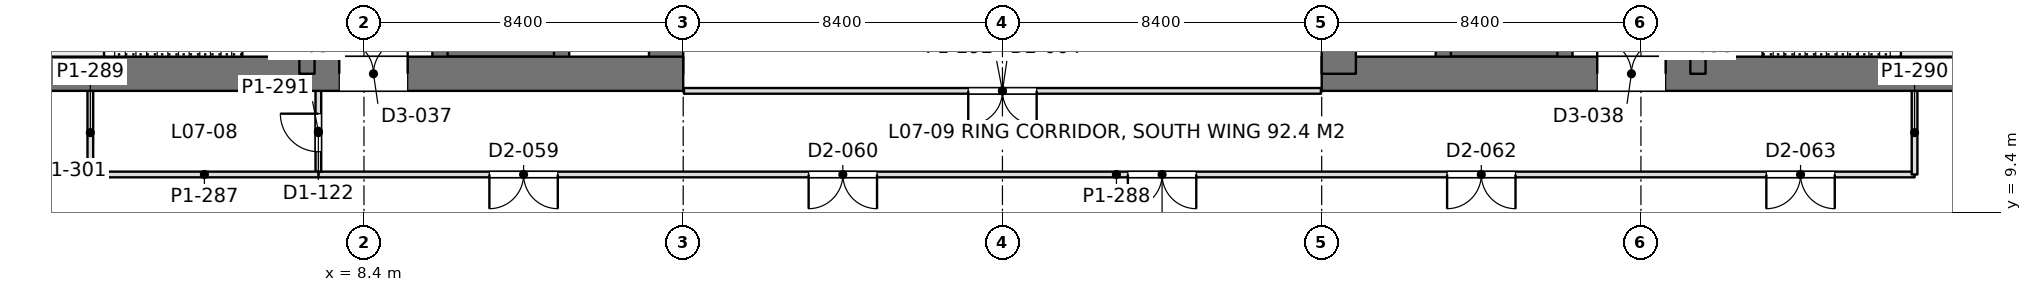
"""IFC4 building model, lengths in metres.
Left out: names, types, materials, properties, quantities, classifications, styles, units other than length and angle.
Written with IfcOpenShell. Run it as: python <this file> out.ifc"""

import sys

from ifc_helpers import new_model, si_unit, direction, frame, frame_2d, origin, place, context, subcontext, project, spatial, rectangle, extrude, element, fill, save


model = new_model("IFC4")
c1 = context("Model", 3, precision=1e-05, world=origin(), true_north=direction((0.0, 1.0)))
c2 = subcontext(c1, "Body", "Model", "MODEL_VIEW")
j1 = project(units=[si_unit("LENGTHUNIT", "METRE"), si_unit("PLANEANGLEUNIT", "RADIAN")], contexts=[c1])
p1 = place(None, origin())
s1 = spatial("IfcSite", under=j1, at=p1, CompositionType="ELEMENT")
p2 = place(p1, origin())
s2 = spatial("IfcBuilding", under=s1, at=p2, CompositionType="ELEMENT")
p3 = place(p2, frame((0.0, 0.0, 32.4)))
s3 = spatial("IfcBuildingStorey", under=s2, at=p3, CompositionType="ELEMENT", Elevation=32.4)
p4 = place(p3, frame((-1.2, 13.05, 0.0), z_axis=(0.0, 0.0, 1.0), x_axis=(1.0, 0.0, 0.0)))
e1 = element("IfcWall", 1, at=p4, inside=s3, PredefinedType="SHEAR", context=c2, shape_type="SweptSolid", body=[
    extrude(rectangle(XDim=18.0, YDim=0.9, at=frame_2d((9.0, 0.0))), origin(), (0.0, 0.0, 1.0), 4.5),
])
p5 = place(p4, frame((8.95, 0.0, 0.0)))
e2 = element("IfcOpeningElement", 2, at=p5, cuts=e1, PredefinedType="OPENING", context=c2, shape_type="SweptSolid", body=[
    extrude(rectangle(XDim=1.8, YDim=2.4, at=frame_2d((0.9, 1.2))), frame((0.0, 0.46, 0.0), z_axis=(0.0, -1.0, 0.0), x_axis=(1.0, 0.0, 0.0)), (0.0, 0.0, 1.0), 0.92),
])
p6 = place(p3, frame((16.35, 13.05, 0.0), z_axis=(0.0, 0.0, 1.0), x_axis=(0.0, 1.0, 0.0)))
e3 = element("IfcWall", 3, at=p6, inside=s3, PredefinedType="SHEAR", context=c2, shape_type="SweptSolid", body=[
    extrude(rectangle(XDim=24.3, YDim=0.9, at=frame_2d((12.15, 0.0))), origin(), (0.0, 0.0, 1.0), 4.5),
])
p7 = place(p3, frame((6.9, 13.05, 0.0), z_axis=(0.0, 0.0, 1.0), x_axis=(0.0, 1.0, 0.0)))
e4 = element("IfcWall", 4, at=p7, inside=s3, PredefinedType="SHEAR", context=c2, shape_type="SweptSolid", body=[
    extrude(rectangle(XDim=24.3, YDim=0.4, at=frame_2d((12.15, 0.0))), origin(), (0.0, 0.0, 1.0), 4.5),
])
p8 = place(p7, frame((1.3, 0.0, 0.0)))
e5 = element("IfcOpeningElement", 5, at=p8, cuts=e4, PredefinedType="OPENING", context=c2, shape_type="SweptSolid", body=[
    extrude(rectangle(XDim=1.0, YDim=2.2, at=frame_2d((0.5, 1.1))), frame((0.0, 0.21, 0.0), z_axis=(0.0, -1.0, 0.0), x_axis=(1.0, 0.0, 0.0)), (0.0, 0.0, 1.0), 0.42),
])
p9 = place(p7, frame((22.0, 0.0, 0.0)))
e6 = element("IfcOpeningElement", 6, at=p9, cuts=e4, PredefinedType="OPENING", context=c2, shape_type="SweptSolid", body=[
    extrude(rectangle(XDim=1.0, YDim=2.2, at=frame_2d((0.5, 1.1))), frame((0.0, 0.21, 0.0), z_axis=(0.0, -1.0, 0.0), x_axis=(1.0, 0.0, 0.0)), (0.0, 0.0, 1.0), 0.42),
])
p10 = place(p7, frame((5.55, 0.0, 0.0)))
e7 = element("IfcOpeningElement", 7, at=p10, cuts=e4, PredefinedType="OPENING", context=c2, shape_type="SweptSolid", body=[
    extrude(rectangle(XDim=1.0, YDim=2.2, at=frame_2d((0.5, 1.1))), frame((0.0, 0.21, 0.0), z_axis=(0.0, -1.0, 0.0), x_axis=(1.0, 0.0, 0.0)), (0.0, 0.0, 1.0), 0.42),
])
p11 = place(p7, frame((9.55, 0.0, 0.0)))
e8 = element("IfcOpeningElement", 8, at=p11, cuts=e4, PredefinedType="OPENING", context=c2, shape_type="SweptSolid", body=[
    extrude(rectangle(XDim=1.0, YDim=2.2, at=frame_2d((0.5, 1.1))), frame((0.0, 0.21, 0.0), z_axis=(0.0, -1.0, 0.0), x_axis=(1.0, 0.0, 0.0)), (0.0, 0.0, 1.0), 0.42),
])
p12 = place(p7, frame((12.8, 0.0, 0.0)))
e9 = element("IfcOpeningElement", 9, at=p12, cuts=e4, PredefinedType="OPENING", context=c2, shape_type="SweptSolid", body=[
    extrude(rectangle(XDim=1.1, YDim=2.2, at=frame_2d((0.55, 1.1))), frame((0.0, 0.21, 0.0), z_axis=(0.0, -1.0, 0.0), x_axis=(1.0, 0.0, 0.0)), (0.0, 0.0, 1.0), 0.42),
])
p13 = place(p7, frame((15.538, 0.0, 0.0)))
e10 = element("IfcOpeningElement", 10, at=p13, cuts=e4, PredefinedType="OPENING", context=c2, shape_type="SweptSolid", body=[
    extrude(rectangle(XDim=1.1, YDim=2.2, at=frame_2d((0.55, 1.1))), frame((0.0, 0.21, 0.0), z_axis=(0.0, -1.0, 0.0), x_axis=(1.0, 0.0, 0.0)), (0.0, 0.0, 1.0), 0.42),
])
p14 = place(p7, frame((18.262, 0.0, 0.0)))
e11 = element("IfcOpeningElement", 11, at=p14, cuts=e4, PredefinedType="OPENING", context=c2, shape_type="SweptSolid", body=[
    extrude(rectangle(XDim=1.1, YDim=2.2, at=frame_2d((0.55, 1.1))), frame((0.0, 0.21, 0.0), z_axis=(0.0, -1.0, 0.0), x_axis=(1.0, 0.0, 0.0)), (0.0, 0.0, 1.0), 0.42),
])
p15 = place(p3, frame((10.4, 13.05, 0.0), z_axis=(0.0, 0.0, 1.0), x_axis=(0.0, 1.0, 0.0)))
e12 = element("IfcWall", 12, at=p15, inside=s3, PredefinedType="SHEAR", context=c2, shape_type="SweptSolid", body=[
    extrude(rectangle(XDim=24.3, YDim=0.4, at=frame_2d((12.15, 0.0))), origin(), (0.0, 0.0, 1.0), 4.5),
])
p16 = place(p15, frame((1.5, 0.0, 0.0)))
e13 = element("IfcOpeningElement", 13, at=p16, cuts=e12, PredefinedType="OPENING", context=c2, shape_type="SweptSolid", body=[
    extrude(rectangle(XDim=1.1, YDim=2.2, at=frame_2d((0.55, 1.1))), frame((0.0, 0.21, 0.0), z_axis=(0.0, -1.0, 0.0), x_axis=(1.0, 0.0, 0.0)), (0.0, 0.0, 1.0), 0.42),
])
p17 = place(p15, frame((4.35, 0.0, 0.0)))
e14 = element("IfcOpeningElement", 14, at=p17, cuts=e12, PredefinedType="OPENING", context=c2, shape_type="SweptSolid", body=[
    extrude(rectangle(XDim=1.1, YDim=2.2, at=frame_2d((0.55, 1.1))), frame((0.0, 0.21, 0.0), z_axis=(0.0, -1.0, 0.0), x_axis=(1.0, 0.0, 0.0)), (0.0, 0.0, 1.0), 0.42),
])
p18 = place(p15, frame((7.2, 0.0, 0.0)))
e15 = element("IfcOpeningElement", 15, at=p18, cuts=e12, PredefinedType="OPENING", context=c2, shape_type="SweptSolid", body=[
    extrude(rectangle(XDim=1.1, YDim=2.2, at=frame_2d((0.55, 1.1))), frame((0.0, 0.21, 0.0), z_axis=(0.0, -1.0, 0.0), x_axis=(1.0, 0.0, 0.0)), (0.0, 0.0, 1.0), 0.42),
])
p19 = place(p15, frame((21.45, 0.0, 0.0)))
e16 = element("IfcOpeningElement", 16, at=p19, cuts=e12, PredefinedType="OPENING", context=c2, shape_type="SweptSolid", body=[
    extrude(rectangle(XDim=1.1, YDim=2.2, at=frame_2d((0.55, 1.1))), frame((0.0, 0.21, 0.0), z_axis=(0.0, -1.0, 0.0), x_axis=(1.0, 0.0, 0.0)), (0.0, 0.0, 1.0), 0.42),
])
p20 = place(p3, frame((13.6, 13.05, 0.0), z_axis=(0.0, 0.0, 1.0), x_axis=(0.0, 1.0, 0.0)))
e17 = element("IfcWall", 17, at=p20, inside=s3, PredefinedType="SHEAR", context=c2, shape_type="SweptSolid", body=[
    extrude(rectangle(XDim=24.3, YDim=0.4, at=frame_2d((12.15, 0.0))), origin(), (0.0, 0.0, 1.0), 4.5),
])
p21 = place(p3, frame((10.4, 13.65, 0.0), z_axis=(0.0, 0.0, 1.0), x_axis=(1.0, 0.0, 0.0)))
e18 = element("IfcWall", 18, at=p21, inside=s3, PredefinedType="SHEAR", context=c2, shape_type="SweptSolid", body=[
    extrude(rectangle(XDim=3.2, YDim=0.3, at=frame_2d((1.6, 0.0))), origin(), (0.0, 0.0, 1.0), 4.5),
])
p22 = place(p3, frame((33.6, 13.05, 0.0), z_axis=(0.0, 0.0, 1.0), x_axis=(1.0, 0.0, 0.0)))
e19 = element("IfcWall", 19, at=p22, inside=s3, PredefinedType="SHEAR", context=c2, shape_type="SweptSolid", body=[
    extrude(rectangle(XDim=18.0, YDim=0.9, at=frame_2d((9.0, 0.0))), origin(), (0.0, 0.0, 1.0), 4.5),
])
p23 = place(p22, frame((7.25, 0.0, 0.0)))
e20 = element("IfcOpeningElement", 20, at=p23, cuts=e19, PredefinedType="OPENING", context=c2, shape_type="SweptSolid", body=[
    extrude(rectangle(XDim=1.8, YDim=2.4, at=frame_2d((0.9, 1.2))), frame((0.0, 0.46, 0.0), z_axis=(0.0, -1.0, 0.0), x_axis=(1.0, 0.0, 0.0)), (0.0, 0.0, 1.0), 0.92),
])
p24 = place(p3, frame((34.05, 13.05, 0.0), z_axis=(0.0, 0.0, 1.0), x_axis=(0.0, 1.0, 0.0)))
e21 = element("IfcWall", 21, at=p24, inside=s3, PredefinedType="SHEAR", context=c2, shape_type="SweptSolid", body=[
    extrude(rectangle(XDim=24.3, YDim=0.9, at=frame_2d((12.15, 0.0))), origin(), (0.0, 0.0, 1.0), 4.5),
])
p25 = place(p3, frame((43.5, 13.05, 0.0), z_axis=(0.0, 0.0, 1.0), x_axis=(0.0, 1.0, 0.0)))
e22 = element("IfcWall", 22, at=p25, inside=s3, PredefinedType="SHEAR", context=c2, shape_type="SweptSolid", body=[
    extrude(rectangle(XDim=24.3, YDim=0.4, at=frame_2d((12.15, 0.0))), origin(), (0.0, 0.0, 1.0), 4.5),
])
p26 = place(p25, frame((1.3, 0.0, 0.0)))
e23 = element("IfcOpeningElement", 23, at=p26, cuts=e22, PredefinedType="OPENING", context=c2, shape_type="SweptSolid", body=[
    extrude(rectangle(XDim=1.0, YDim=2.2, at=frame_2d((0.5, 1.1))), frame((0.0, 0.21, 0.0), z_axis=(0.0, -1.0, 0.0), x_axis=(1.0, 0.0, 0.0)), (0.0, 0.0, 1.0), 0.42),
])
p27 = place(p25, frame((22.0, 0.0, 0.0)))
e24 = element("IfcOpeningElement", 24, at=p27, cuts=e22, PredefinedType="OPENING", context=c2, shape_type="SweptSolid", body=[
    extrude(rectangle(XDim=1.0, YDim=2.2, at=frame_2d((0.5, 1.1))), frame((0.0, 0.21, 0.0), z_axis=(0.0, -1.0, 0.0), x_axis=(1.0, 0.0, 0.0)), (0.0, 0.0, 1.0), 0.42),
])
p28 = place(p25, frame((5.55, 0.0, 0.0)))
e25 = element("IfcOpeningElement", 25, at=p28, cuts=e22, PredefinedType="OPENING", context=c2, shape_type="SweptSolid", body=[
    extrude(rectangle(XDim=1.0, YDim=2.2, at=frame_2d((0.5, 1.1))), frame((0.0, 0.21, 0.0), z_axis=(0.0, -1.0, 0.0), x_axis=(1.0, 0.0, 0.0)), (0.0, 0.0, 1.0), 0.42),
])
p29 = place(p25, frame((9.55, 0.0, 0.0)))
e26 = element("IfcOpeningElement", 26, at=p29, cuts=e22, PredefinedType="OPENING", context=c2, shape_type="SweptSolid", body=[
    extrude(rectangle(XDim=1.0, YDim=2.2, at=frame_2d((0.5, 1.1))), frame((0.0, 0.21, 0.0), z_axis=(0.0, -1.0, 0.0), x_axis=(1.0, 0.0, 0.0)), (0.0, 0.0, 1.0), 0.42),
])
p30 = place(p25, frame((12.8, 0.0, 0.0)))
e27 = element("IfcOpeningElement", 27, at=p30, cuts=e22, PredefinedType="OPENING", context=c2, shape_type="SweptSolid", body=[
    extrude(rectangle(XDim=1.1, YDim=2.2, at=frame_2d((0.55, 1.1))), frame((0.0, 0.21, 0.0), z_axis=(0.0, -1.0, 0.0), x_axis=(1.0, 0.0, 0.0)), (0.0, 0.0, 1.0), 0.42),
])
p31 = place(p25, frame((15.538, 0.0, 0.0)))
e28 = element("IfcOpeningElement", 28, at=p31, cuts=e22, PredefinedType="OPENING", context=c2, shape_type="SweptSolid", body=[
    extrude(rectangle(XDim=1.1, YDim=2.2, at=frame_2d((0.55, 1.1))), frame((0.0, 0.21, 0.0), z_axis=(0.0, -1.0, 0.0), x_axis=(1.0, 0.0, 0.0)), (0.0, 0.0, 1.0), 0.42),
])
p32 = place(p25, frame((18.262, 0.0, 0.0)))
e29 = element("IfcOpeningElement", 29, at=p32, cuts=e22, PredefinedType="OPENING", context=c2, shape_type="SweptSolid", body=[
    extrude(rectangle(XDim=1.1, YDim=2.2, at=frame_2d((0.55, 1.1))), frame((0.0, 0.21, 0.0), z_axis=(0.0, -1.0, 0.0), x_axis=(1.0, 0.0, 0.0)), (0.0, 0.0, 1.0), 0.42),
])
p33 = place(p3, frame((40.0, 13.05, 0.0), z_axis=(0.0, 0.0, 1.0), x_axis=(0.0, 1.0, 0.0)))
e30 = element("IfcWall", 30, at=p33, inside=s3, PredefinedType="SHEAR", context=c2, shape_type="SweptSolid", body=[
    extrude(rectangle(XDim=24.3, YDim=0.4, at=frame_2d((12.15, 0.0))), origin(), (0.0, 0.0, 1.0), 4.5),
])
p34 = place(p33, frame((1.5, 0.0, 0.0)))
e31 = element("IfcOpeningElement", 31, at=p34, cuts=e30, PredefinedType="OPENING", context=c2, shape_type="SweptSolid", body=[
    extrude(rectangle(XDim=1.1, YDim=2.2, at=frame_2d((0.55, 1.1))), frame((0.0, 0.21, 0.0), z_axis=(0.0, -1.0, 0.0), x_axis=(1.0, 0.0, 0.0)), (0.0, 0.0, 1.0), 0.42),
])
p35 = place(p33, frame((4.35, 0.0, 0.0)))
e32 = element("IfcOpeningElement", 32, at=p35, cuts=e30, PredefinedType="OPENING", context=c2, shape_type="SweptSolid", body=[
    extrude(rectangle(XDim=1.1, YDim=2.2, at=frame_2d((0.55, 1.1))), frame((0.0, 0.21, 0.0), z_axis=(0.0, -1.0, 0.0), x_axis=(1.0, 0.0, 0.0)), (0.0, 0.0, 1.0), 0.42),
])
p36 = place(p33, frame((7.2, 0.0, 0.0)))
e33 = element("IfcOpeningElement", 33, at=p36, cuts=e30, PredefinedType="OPENING", context=c2, shape_type="SweptSolid", body=[
    extrude(rectangle(XDim=1.1, YDim=2.2, at=frame_2d((0.55, 1.1))), frame((0.0, 0.21, 0.0), z_axis=(0.0, -1.0, 0.0), x_axis=(1.0, 0.0, 0.0)), (0.0, 0.0, 1.0), 0.42),
])
p37 = place(p33, frame((21.45, 0.0, 0.0)))
e34 = element("IfcOpeningElement", 34, at=p37, cuts=e30, PredefinedType="OPENING", context=c2, shape_type="SweptSolid", body=[
    extrude(rectangle(XDim=1.1, YDim=2.2, at=frame_2d((0.55, 1.1))), frame((0.0, 0.21, 0.0), z_axis=(0.0, -1.0, 0.0), x_axis=(1.0, 0.0, 0.0)), (0.0, 0.0, 1.0), 0.42),
])
p38 = place(p3, frame((36.8, 13.05, 0.0), z_axis=(0.0, 0.0, 1.0), x_axis=(0.0, 1.0, 0.0)))
e35 = element("IfcWall", 35, at=p38, inside=s3, PredefinedType="SHEAR", context=c2, shape_type="SweptSolid", body=[
    extrude(rectangle(XDim=24.3, YDim=0.4, at=frame_2d((12.15, 0.0))), origin(), (0.0, 0.0, 1.0), 4.5),
])
p39 = place(p3, frame((40.0, 13.65, 0.0), z_axis=(0.0, 0.0, 1.0), x_axis=(-1.0, 0.0, 0.0)))
e36 = element("IfcWall", 36, at=p39, inside=s3, PredefinedType="SHEAR", context=c2, shape_type="SweptSolid", body=[
    extrude(rectangle(XDim=3.2, YDim=0.3, at=frame_2d((1.6, 0.0))), origin(), (0.0, 0.0, 1.0), 4.5),
])
p40 = place(p3, frame((7.198, 10.4, 0.0), z_axis=(0.0, 0.0, 1.0), x_axis=(1.0, 0.0, 0.0)))
e37 = element("IfcWall", 37, at=p40, inside=s3, PredefinedType="PARTITIONING", context=c2, shape_type="SweptSolid", body=[
    extrude(rectangle(XDim=42.002, YDim=0.15, at=frame_2d((21.001, 0.0))), origin(), (0.0, 0.0, 1.0), 3.74),
])
p41 = place(p40, frame((4.502, 0.0, 0.0)))
e38 = element("IfcOpeningElement", 38, at=p41, cuts=e37, PredefinedType="OPENING", context=c2, shape_type="SweptSolid", body=[
    extrude(rectangle(XDim=1.8, YDim=2.2, at=frame_2d((0.9, 1.1))), frame((0.0, 0.085, 0.0), z_axis=(0.0, -1.0, 0.0), x_axis=(1.0, 0.0, 0.0)), (0.0, 0.0, 1.0), 0.17),
])
p42 = place(p40, frame((12.902, 0.0, 0.0)))
e39 = element("IfcOpeningElement", 39, at=p42, cuts=e37, PredefinedType="OPENING", context=c2, shape_type="SweptSolid", body=[
    extrude(rectangle(XDim=1.8, YDim=2.2, at=frame_2d((0.9, 1.1))), frame((0.0, 0.085, 0.0), z_axis=(0.0, -1.0, 0.0), x_axis=(1.0, 0.0, 0.0)), (0.0, 0.0, 1.0), 0.17),
])
p43 = place(p40, frame((21.302, 0.0, 0.0)))
e40 = element("IfcOpeningElement", 40, at=p43, cuts=e37, PredefinedType="OPENING", context=c2, shape_type="SweptSolid", body=[
    extrude(rectangle(XDim=1.8, YDim=2.2, at=frame_2d((0.9, 1.1))), frame((0.0, 0.085, 0.0), z_axis=(0.0, -1.0, 0.0), x_axis=(1.0, 0.0, 0.0)), (0.0, 0.0, 1.0), 0.17),
])
p44 = place(p40, frame((29.702, 0.0, 0.0)))
e41 = element("IfcOpeningElement", 41, at=p44, cuts=e37, PredefinedType="OPENING", context=c2, shape_type="SweptSolid", body=[
    extrude(rectangle(XDim=1.8, YDim=2.2, at=frame_2d((0.9, 1.1))), frame((0.0, 0.085, 0.0), z_axis=(0.0, -1.0, 0.0), x_axis=(1.0, 0.0, 0.0)), (0.0, 0.0, 1.0), 0.17),
])
p45 = place(p40, frame((38.102, 0.0, 0.0)))
e42 = element("IfcOpeningElement", 42, at=p45, cuts=e37, PredefinedType="OPENING", context=c2, shape_type="SweptSolid", body=[
    extrude(rectangle(XDim=1.8, YDim=2.2, at=frame_2d((0.9, 1.1))), frame((0.0, 0.085, 0.0), z_axis=(0.0, -1.0, 0.0), x_axis=(1.0, 0.0, 0.0)), (0.0, 0.0, 1.0), 0.17),
])
p46 = place(p3, frame((7.2, 10.474, 0.0), z_axis=(0.0, 0.0, 1.0), x_axis=(0.0, 1.0, 0.0)))
e43 = element("IfcWall", 43, at=p46, inside=s3, PredefinedType="PARTITIONING", context=c2, shape_type="SweptSolid", body=[
    extrude(rectangle(XDim=2.128, YDim=0.15, at=frame_2d((1.064, 0.0))), origin(), (0.0, 0.0, 1.0), 4.34),
])
p47 = place(p46, frame((0.526, 0.0, 0.0)))
e44 = element("IfcOpeningElement", 44, at=p47, cuts=e43, PredefinedType="OPENING", context=c2, shape_type="SweptSolid", body=[
    extrude(rectangle(XDim=1.0, YDim=2.2, at=frame_2d((0.5, 1.1))), frame((0.0, 0.085, 0.0), z_axis=(0.0, -1.0, 0.0), x_axis=(1.0, 0.0, 0.0)), (0.0, 0.0, 1.0), 0.17),
])
p48 = place(p3, frame((49.2, 10.4, 0.0), z_axis=(0.0, 0.0, 1.0), x_axis=(0.0, 1.0, 0.0)))
e45 = element("IfcWall", 45, at=p48, inside=s3, PredefinedType="PARTITIONING", context=c2, shape_type="SweptSolid", body=[
    extrude(rectangle(XDim=2.202, YDim=0.15, at=frame_2d((1.101, 0.0))), origin(), (0.0, 0.0, 1.0), 4.34),
])
p49 = place(p3, frame((1.2, 10.4, 0.0), z_axis=(0.0, 0.0, 1.0), x_axis=(1.0, 0.0, 0.0)))
e46 = element("IfcWall", 46, at=p49, inside=s3, PredefinedType="PARTITIONING", context=c2, shape_type="SweptSolid", body=[
    extrude(rectangle(XDim=6.002, YDim=0.15, at=frame_2d((3.001, 0.0))), origin(), (0.0, 0.0, 1.0), 4.34),
])
p50 = place(p3, frame((1.2, 10.4, 0.0), z_axis=(0.0, 0.0, 1.0), x_axis=(0.0, 1.0, 0.0)))
e47 = element("IfcWall", 47, at=p50, inside=s3, PredefinedType="PARTITIONING", context=c2, shape_type="SweptSolid", body=[
    extrude(rectangle(XDim=2.202, YDim=0.15, at=frame_2d((1.101, 0.0))), origin(), (0.0, 0.0, 1.0), 4.34),
])
p51 = place(p3, frame((16.82, 12.6, 0.0), z_axis=(0.0, 0.0, 1.0), x_axis=(1.0, 0.0, 0.0)))
e48 = element("IfcWall", 48, at=p51, inside=s3, PredefinedType="PARTITIONING", context=c2, shape_type="SweptSolid", body=[
    extrude(rectangle(XDim=16.76, YDim=0.15, at=frame_2d((8.38, 0.0))), origin(), (0.0, 0.0, 1.0), 3.74),
])
p52 = place(p51, frame((7.48, 0.0, 0.0)))
e49 = element("IfcOpeningElement", 49, at=p52, cuts=e48, PredefinedType="OPENING", context=c2, shape_type="SweptSolid", body=[
    extrude(rectangle(XDim=1.8, YDim=2.2, at=frame_2d((0.9, 1.1))), frame((0.0, 0.085, 0.0), z_axis=(0.0, -1.0, 0.0), x_axis=(1.0, 0.0, 0.0)), (0.0, 0.0, 1.0), 0.17),
])
p53 = place(p5, origin())
e50 = element("IfcDoor", 50, at=p53, inside=s3, OperationType="DOUBLE_DOOR_SINGLE_SWING", PredefinedType="DOOR", context=c2, shape_type="SweptSolid", body=[
    extrude(rectangle(XDim=1.8, YDim=2.4, at=frame_2d((0.9, 1.2))), frame((0.0, 0.025, 0.0), z_axis=(0.0, -1.0, 0.0), x_axis=(1.0, 0.0, 0.0)), (0.0, 0.0, 1.0), 0.05),
])
fill(e2, e50)
p54 = place(p23, origin())
e51 = element("IfcDoor", 51, at=p54, inside=s3, OperationType="DOUBLE_DOOR_SINGLE_SWING", PredefinedType="DOOR", context=c2, shape_type="SweptSolid", body=[
    extrude(rectangle(XDim=1.8, YDim=2.4, at=frame_2d((0.9, 1.2))), frame((0.0, 0.025, 0.0), z_axis=(0.0, -1.0, 0.0), x_axis=(1.0, 0.0, 0.0)), (0.0, 0.0, 1.0), 0.05),
])
fill(e20, e51)
p55 = place(p41, frame((1.8, 0.0, 0.0), z_axis=(0.0, 0.0, 1.0), x_axis=(-1.0, 0.0, 0.0)))
e52 = element("IfcDoor", 52, at=p55, inside=s3, OperationType="DOUBLE_DOOR_SINGLE_SWING", PredefinedType="DOOR", context=c2, shape_type="SweptSolid", body=[
    extrude(rectangle(XDim=1.8, YDim=2.2, at=frame_2d((0.9, 1.1))), frame((0.0, 0.025, 0.0), z_axis=(0.0, -1.0, 0.0), x_axis=(1.0, 0.0, 0.0)), (0.0, 0.0, 1.0), 0.05),
])
fill(e38, e52)
p56 = place(p42, frame((1.8, 0.0, 0.0), z_axis=(0.0, 0.0, 1.0), x_axis=(-1.0, 0.0, 0.0)))
e53 = element("IfcDoor", 53, at=p56, inside=s3, OperationType="DOUBLE_DOOR_SINGLE_SWING", PredefinedType="DOOR", context=c2, shape_type="SweptSolid", body=[
    extrude(rectangle(XDim=1.8, YDim=2.2, at=frame_2d((0.9, 1.1))), frame((0.0, 0.025, 0.0), z_axis=(0.0, -1.0, 0.0), x_axis=(1.0, 0.0, 0.0)), (0.0, 0.0, 1.0), 0.05),
])
fill(e39, e53)
p57 = place(p43, frame((1.8, 0.0, 0.0), z_axis=(0.0, 0.0, 1.0), x_axis=(-1.0, 0.0, 0.0)))
e54 = element("IfcDoor", 54, at=p57, inside=s3, OperationType="DOUBLE_DOOR_SINGLE_SWING", PredefinedType="DOOR", context=c2, shape_type="SweptSolid", body=[
    extrude(rectangle(XDim=1.8, YDim=2.2, at=frame_2d((0.9, 1.1))), frame((0.0, 0.025, 0.0), z_axis=(0.0, -1.0, 0.0), x_axis=(1.0, 0.0, 0.0)), (0.0, 0.0, 1.0), 0.05),
])
fill(e40, e54)
p58 = place(p44, frame((1.8, 0.0, 0.0), z_axis=(0.0, 0.0, 1.0), x_axis=(-1.0, 0.0, 0.0)))
e55 = element("IfcDoor", 55, at=p58, inside=s3, OperationType="DOUBLE_DOOR_SINGLE_SWING", PredefinedType="DOOR", context=c2, shape_type="SweptSolid", body=[
    extrude(rectangle(XDim=1.8, YDim=2.2, at=frame_2d((0.9, 1.1))), frame((0.0, 0.025, 0.0), z_axis=(0.0, -1.0, 0.0), x_axis=(1.0, 0.0, 0.0)), (0.0, 0.0, 1.0), 0.05),
])
fill(e41, e55)
p59 = place(p45, frame((1.8, 0.0, 0.0), z_axis=(0.0, 0.0, 1.0), x_axis=(-1.0, 0.0, 0.0)))
e56 = element("IfcDoor", 56, at=p59, inside=s3, OperationType="DOUBLE_DOOR_SINGLE_SWING", PredefinedType="DOOR", context=c2, shape_type="SweptSolid", body=[
    extrude(rectangle(XDim=1.8, YDim=2.2, at=frame_2d((0.9, 1.1))), frame((0.0, 0.025, 0.0), z_axis=(0.0, -1.0, 0.0), x_axis=(1.0, 0.0, 0.0)), (0.0, 0.0, 1.0), 0.05),
])
fill(e42, e56)
p60 = place(p47, origin())
e57 = element("IfcDoor", 57, at=p60, inside=s3, OperationType="SINGLE_SWING_RIGHT", PredefinedType="DOOR", context=c2, shape_type="SweptSolid", body=[
    extrude(rectangle(XDim=1.0, YDim=2.2, at=frame_2d((0.5, 1.1))), frame((0.0, 0.025, 0.0), z_axis=(0.0, -1.0, 0.0), x_axis=(1.0, 0.0, 0.0)), (0.0, 0.0, 1.0), 0.05),
])
fill(e44, e57)
p61 = place(p52, frame((1.8, 0.0, 0.0), z_axis=(0.0, 0.0, 1.0), x_axis=(-1.0, 0.0, 0.0)))
e58 = element("IfcDoor", 58, at=p61, inside=s3, OperationType="DOUBLE_DOOR_SINGLE_SWING", PredefinedType="DOOR", context=c2, shape_type="SweptSolid", body=[
    extrude(rectangle(XDim=1.8, YDim=2.2, at=frame_2d((0.9, 1.1))), frame((0.0, 0.025, 0.0), z_axis=(0.0, -1.0, 0.0), x_axis=(1.0, 0.0, 0.0)), (0.0, 0.0, 1.0), 0.05),
])
fill(e49, e58)
save(model, sys.argv[1])
